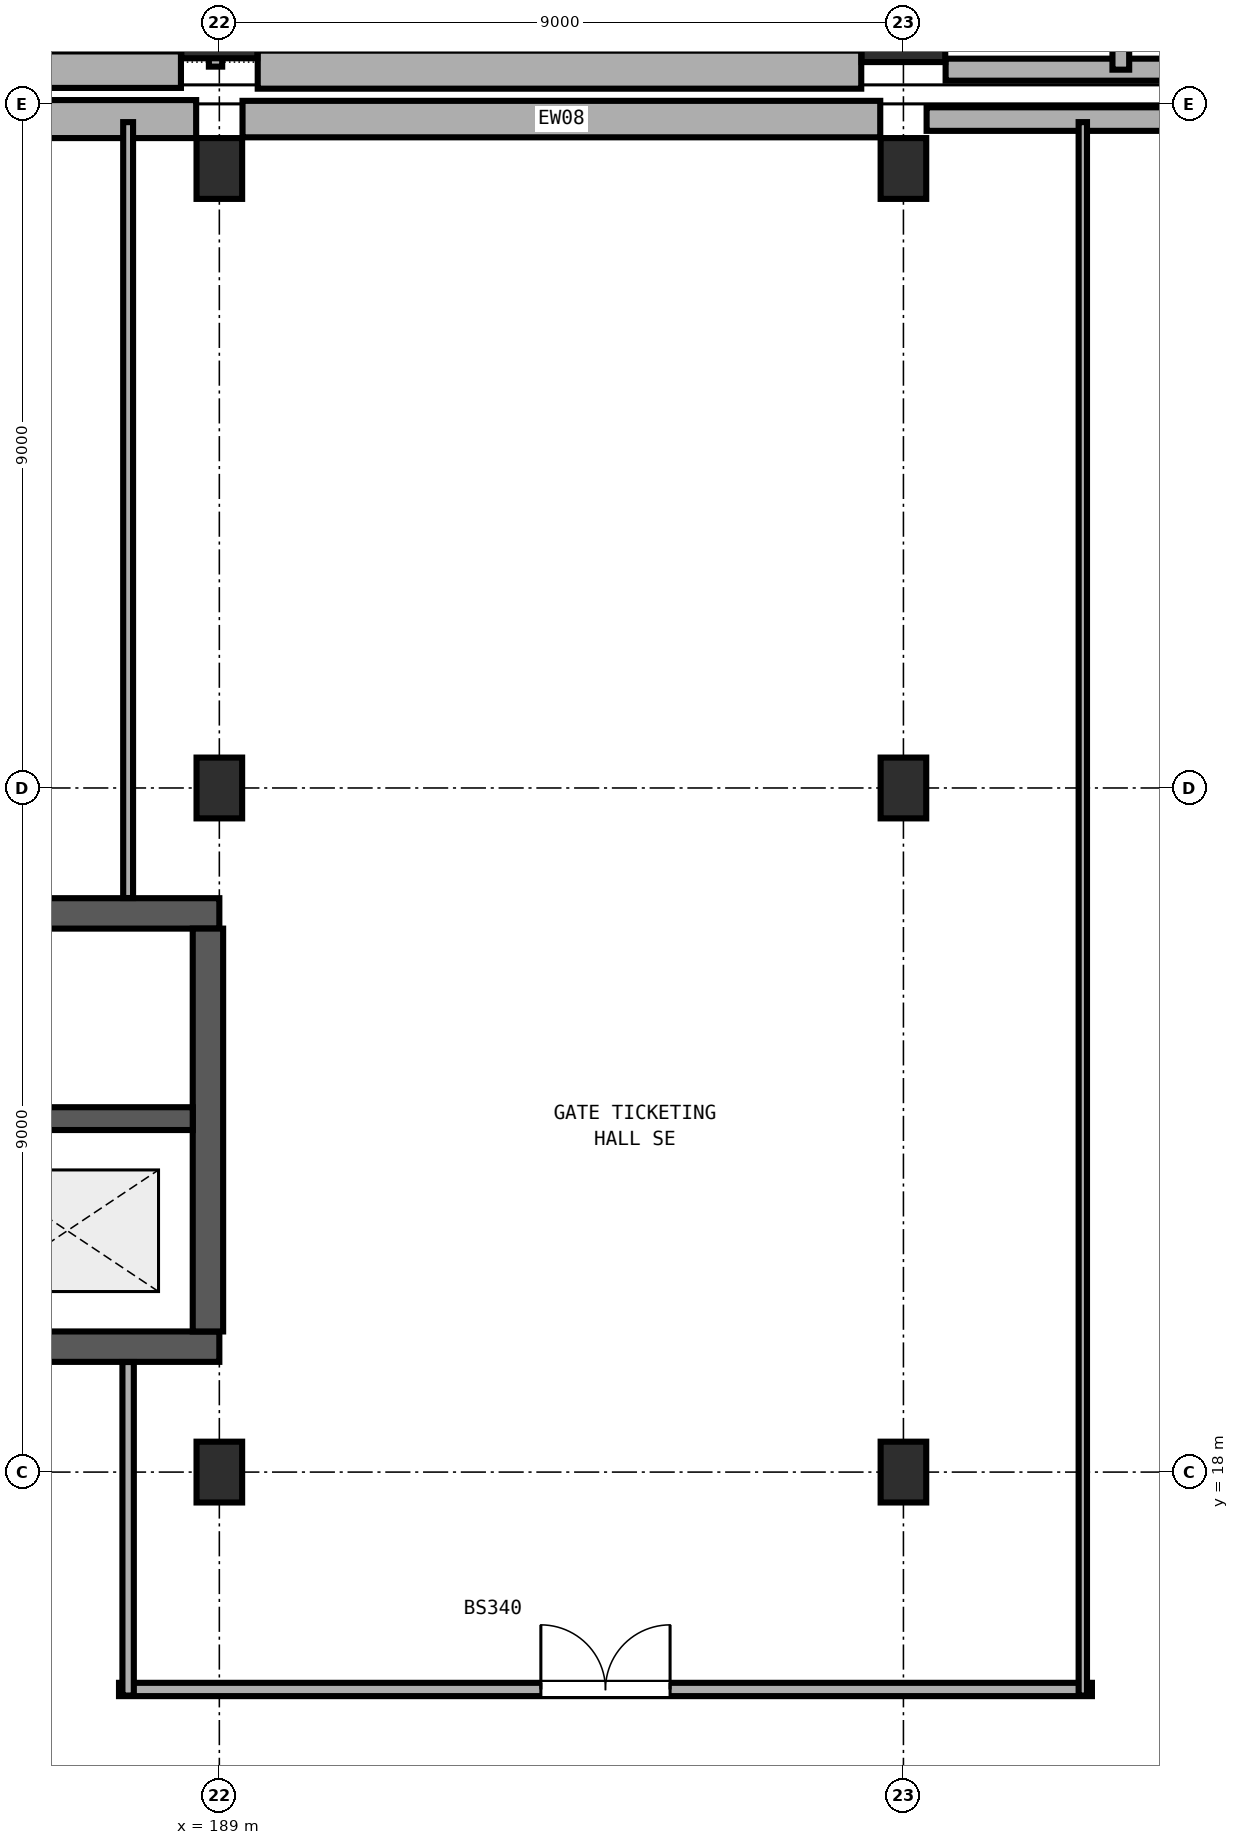
"""IFC4 building model, lengths in metres.
Left out: names, types, materials, properties, quantities, classifications, styles, units other than length and angle.
Written with IfcOpenShell. Run it as: python <this file> out.ifc"""

import sys

from ifc_helpers import new_model, si_unit, direction, frame, frame_2d, origin, origin_2d, place, context, subcontext, project, spatial, rectangle, extrude, element, fill, save


model = new_model("IFC4")
c1 = context("Model", 3, precision=1e-05, world=origin(), true_north=direction((0.0, 1.0)))
c2 = subcontext(c1, "Body", "Model", "MODEL_VIEW")
j1 = project(units=[si_unit("LENGTHUNIT", "METRE"), si_unit("PLANEANGLEUNIT", "RADIAN")], contexts=[c1])
p1 = place(None, origin())
s1 = spatial("IfcSite", under=j1, at=p1, CompositionType="ELEMENT")
p2 = place(p1, origin())
s2 = spatial("IfcBuilding", under=s1, at=p2, CompositionType="ELEMENT")
p3 = place(p2, origin())
s3 = spatial("IfcBuildingStorey", under=s2, at=p3, CompositionType="ELEMENT", Elevation=0.0)
p4 = place(p3, frame((189.0, 37.1, 0.0), z_axis=(0.0, 0.0, 1.0), x_axis=(1.0, 0.0, 0.0)))
e1 = element("IfcColumn", 1, at=p4, inside=s3, PredefinedType="COLUMN", context=c2, shape_type="SweptSolid", body=[
    extrude(rectangle(XDim=1.0, YDim=1.0, at=origin_2d()), origin(), (0.0, 0.0, 1.0), 4.8),
])
p5 = place(p3, frame((198.0, 37.1, 0.0), z_axis=(0.0, 0.0, 1.0), x_axis=(1.0, 0.0, 0.0)))
e2 = element("IfcColumn", 2, at=p5, inside=s3, PredefinedType="COLUMN", context=c2, shape_type="SweptSolid", body=[
    extrude(rectangle(XDim=1.1, YDim=1.1, at=origin_2d()), origin(), (0.0, 0.0, 1.0), 4.8),
])
for number, where, z_axis, x_axis in (
    (3, (189.0, 18.0, 0.0), (0.0, 0.0, 1.0), (1.0, 0.0, 0.0)),
    (4, (189.0, 27.0, 0.0), (0.0, 0.0, 1.0), (1.0, 0.0, 0.0)),
    (5, (189.0, 35.15, 0.0), (0.0, 0.0, 1.0), (1.0, 0.0, 0.0)),
    (6, (198.0, 18.0, 0.0), (0.0, 0.0, 1.0), (1.0, 0.0, 0.0)),
    (7, (198.0, 27.0, 0.0), (0.0, 0.0, 1.0), (1.0, 0.0, 0.0)),
    (8, (198.0, 35.15, 0.0), (0.0, 0.0, 1.0), (1.0, 0.0, 0.0)),
):
    element("IfcColumn", number, at=place(p3, frame(where, z_axis=z_axis, x_axis=x_axis)), inside=s3, PredefinedType="COLUMN", context=c2, shape_type="SweptSolid", body=[
        extrude(rectangle(XDim=0.6, YDim=0.8, at=origin_2d()), origin(), (0.0, 0.0, 1.0), 4.8),
    ])
p6 = place(p3, frame((171.0, 19.65, 0.0), z_axis=(0.0, 0.0, 1.0), x_axis=(1.0, 0.0, 0.0)))
e9 = element("IfcWall", 9, at=p6, inside=s3, PredefinedType="SHEAR", context=c2, shape_type="SweptSolid", body=[
    extrude(rectangle(XDim=18.0, YDim=0.4, at=frame_2d((9.0, 0.0))), origin(), (0.0, 0.0, 1.0), 4.5),
])
p7 = place(p6, frame((11.4, 0.0, 0.0)))
e10 = element("IfcOpeningElement", 10, at=p7, cuts=e9, PredefinedType="OPENING", context=c2, shape_type="SweptSolid", body=[
    extrude(rectangle(XDim=1.9, YDim=2.25, at=frame_2d((0.95, 1.125))), frame((0.0, 0.21, 0.0), z_axis=(0.0, -1.0, 0.0), x_axis=(1.0, 0.0, 0.0)), (0.0, 0.0, 1.0), 0.42),
])
p8 = place(p3, frame((189.0, 25.35, 0.0), z_axis=(0.0, 0.0, 1.0), x_axis=(-1.0, 0.0, 0.0)))
e11 = element("IfcWall", 11, at=p8, inside=s3, PredefinedType="SHEAR", context=c2, shape_type="SweptSolid", body=[
    extrude(rectangle(XDim=18.0, YDim=0.4, at=frame_2d((9.0, 0.0))), origin(), (0.0, 0.0, 1.0), 4.5),
])
p9 = place(p3, frame((188.85, 19.85, 0.0), z_axis=(0.0, 0.0, 1.0), x_axis=(0.0, 1.0, 0.0)))
e12 = element("IfcWall", 12, at=p9, inside=s3, PredefinedType="SHEAR", context=c2, shape_type="SweptSolid", body=[
    extrude(rectangle(XDim=5.3, YDim=0.4, at=frame_2d((2.65, 0.0))), origin(), (0.0, 0.0, 1.0), 4.5),
])
p10 = place(p3, frame((185.8, 22.65, 0.0), z_axis=(0.0, 0.0, 1.0), x_axis=(1.0, 0.0, 0.0)))
e13 = element("IfcWall", 13, at=p10, inside=s3, PredefinedType="SHEAR", context=c2, shape_type="SweptSolid", body=[
    extrude(rectangle(XDim=2.85, YDim=0.3, at=frame_2d((1.425, 0.0))), origin(), (0.0, 0.0, 1.0), 4.5),
])
p11 = place(p3, frame((206.495, 36.45, 0.0), z_axis=(0.0, 0.0, 1.0), x_axis=(-1.0, 0.0, 0.0)))
e14 = element("IfcWall", 14, at=p11, inside=s3, PredefinedType="SOLIDWALL", context=c2, shape_type="SweptSolid", body=[
    extrude(rectangle(XDim=7.94, YDim=0.29, at=frame_2d((3.97, 0.0))), origin(), (0.0, 0.0, 1.0), 3.28),
])
p12 = place(p3, frame((197.445, 36.45, 0.0), z_axis=(0.0, 0.0, 1.0), x_axis=(-1.0, 0.0, 0.0)))
e15 = element("IfcWall", 15, at=p12, inside=s3, PredefinedType="SOLIDWALL", context=c2, shape_type="SweptSolid", body=[
    extrude(rectangle(XDim=7.94, YDim=0.5, at=frame_2d((3.97, 0.0))), origin(), (0.0, 0.0, 1.0), 3.28),
])
p13 = place(p3, frame((188.495, 36.45, 0.0), z_axis=(0.0, 0.0, 1.0), x_axis=(-1.0, 0.0, 0.0)))
e16 = element("IfcWall", 16, at=p13, inside=s3, PredefinedType="SOLIDWALL", context=c2, shape_type="SweptSolid", body=[
    extrude(rectangle(XDim=7.94, YDim=0.48, at=frame_2d((3.97, 0.0))), origin(), (0.0, 0.0, 1.0), 3.28),
])
p14 = place(p3, frame((180.305, 35.8, 0.0), z_axis=(0.0, 0.0, 1.0), x_axis=(1.0, 0.0, 0.0)))
e17 = element("IfcWall", 17, at=p14, inside=s3, PredefinedType="SOLIDWALL", context=c2, shape_type="SweptSolid", body=[
    extrude(rectangle(XDim=8.39, YDim=0.5, at=frame_2d((4.195, 0.0))), origin(), (0.0, 0.0, 1.0), 3.28),
])
p15 = place(p3, frame((189.305, 35.8, 0.0), z_axis=(0.0, 0.0, 1.0), x_axis=(1.0, 0.0, 0.0)))
e18 = element("IfcWall", 18, at=p15, inside=s3, PredefinedType="SOLIDWALL", context=c2, shape_type="SweptSolid", body=[
    extrude(rectangle(XDim=8.39, YDim=0.48, at=frame_2d((4.195, 0.0))), origin(), (0.0, 0.0, 1.0), 3.28),
])
p16 = place(p3, frame((198.305, 35.8, 0.0), z_axis=(0.0, 0.0, 1.0), x_axis=(1.0, 0.0, 0.0)))
e19 = element("IfcWall", 19, at=p16, inside=s3, PredefinedType="SOLIDWALL", context=c2, shape_type="SweptSolid", body=[
    extrude(rectangle(XDim=8.39, YDim=0.31, at=frame_2d((4.195, 0.0))), origin(), (0.0, 0.0, 1.0), 3.28),
])
p17 = place(p3, frame((188.95, 53.148, 0.0), z_axis=(0.0, 0.0, 1.0), x_axis=(0.0, -1.0, 0.0)))
e20 = element("IfcWall", 20, at=p17, inside=s3, PredefinedType="PARTITIONING", context=c2, shape_type="SweptSolid", body=[
    extrude(rectangle(XDim=16.658, YDim=0.175, at=frame_2d((8.329, 0.0))), origin(), (0.0, 0.0, 1.0), 3.28),
])
p18 = place(p3, frame((200.86, 36.45, 0.0), z_axis=(0.0, 0.0, 1.0), x_axis=(0.0, 1.0, 0.0)))
e21 = element("IfcWall", 21, at=p18, inside=s3, PredefinedType="PARTITIONING", context=c2, shape_type="SweptSolid", body=[
    extrude(rectangle(XDim=22.78, YDim=0.22, at=frame_2d((11.39, 0.0))), origin(), (0.0, 0.0, 1.0), 3.28),
])
p19 = place(p18, frame((10.54, 0.0, 0.0)))
e22 = element("IfcOpeningElement", 22, at=p19, cuts=e21, PredefinedType="OPENING", context=c2, shape_type="SweptSolid", body=[
    extrude(rectangle(XDim=1.7, YDim=2.2, at=frame_2d((0.85, 1.1))), frame((0.0, 0.12, 0.0), z_axis=(0.0, -1.0, 0.0), x_axis=(1.0, 0.0, 0.0)), (0.0, 0.0, 1.0), 0.24),
])
p20 = place(p3, frame((187.68, 15.14, 0.0), z_axis=(0.0, 0.0, 1.0), x_axis=(1.0, 0.0, 0.0)))
e23 = element("IfcWall", 23, at=p20, inside=s3, PredefinedType="PARTITIONING", context=c2, shape_type="SweptSolid", body=[
    extrude(rectangle(XDim=12.8, YDim=0.175, at=frame_2d((6.4, 0.0))), origin(), (0.0, 0.0, 1.0), 3.28),
])
p21 = place(p20, frame((5.55, 0.0, 0.0)))
e24 = element("IfcOpeningElement", 24, at=p21, cuts=e23, PredefinedType="OPENING", context=c2, shape_type="SweptSolid", body=[
    extrude(rectangle(XDim=1.7, YDim=2.2, at=frame_2d((0.85, 1.1))), frame((0.0, 0.097, 0.0), z_axis=(0.0, -1.0, 0.0), x_axis=(1.0, 0.0, 0.0)), (0.0, 0.0, 1.0), 0.195),
])
p22 = place(p3, frame((187.8, 15.06, 0.0), z_axis=(0.0, 0.0, 1.0), x_axis=(0.0, 1.0, 0.0)))
e25 = element("IfcWall", 25, at=p22, inside=s3, PredefinedType="PARTITIONING", context=c2, shape_type="SweptSolid", body=[
    extrude(rectangle(XDim=4.388, YDim=0.15, at=frame_2d((2.194, 0.0))), origin(), (0.0, 0.0, 1.0), 3.28),
])
p23 = place(p3, frame((187.8, 25.552, 0.0), z_axis=(0.0, 0.0, 1.0), x_axis=(0.0, 1.0, 0.0)))
e26 = element("IfcWall", 26, at=p23, inside=s3, PredefinedType="PARTITIONING", context=c2, shape_type="SweptSolid", body=[
    extrude(rectangle(XDim=10.208, YDim=0.13, at=frame_2d((5.104, 0.0))), origin(), (0.0, 0.0, 1.0), 3.28),
])
p24 = place(p3, frame((200.36, 35.76, 0.0), z_axis=(0.0, 0.0, 1.0), x_axis=(0.0, -1.0, 0.0)))
e27 = element("IfcWall", 27, at=p24, inside=s3, PredefinedType="PARTITIONING", context=c2, shape_type="SweptSolid", body=[
    extrude(rectangle(XDim=20.7, YDim=0.11, at=frame_2d((10.35, 0.0))), origin(), (0.0, 0.0, 1.0), 3.28),
])
p25 = place(p21, origin())
e28 = element("IfcDoor", 28, at=p25, inside=s3, OperationType="DOUBLE_DOOR_SINGLE_SWING", PredefinedType="DOOR", context=c2, shape_type="SweptSolid", body=[
    extrude(rectangle(XDim=1.7, YDim=2.2, at=frame_2d((0.85, 1.1))), frame((0.0, 0.025, 0.0), z_axis=(0.0, -1.0, 0.0), x_axis=(1.0, 0.0, 0.0)), (0.0, 0.0, 1.0), 0.05),
])
fill(e24, e28)
save(model, sys.argv[1])
